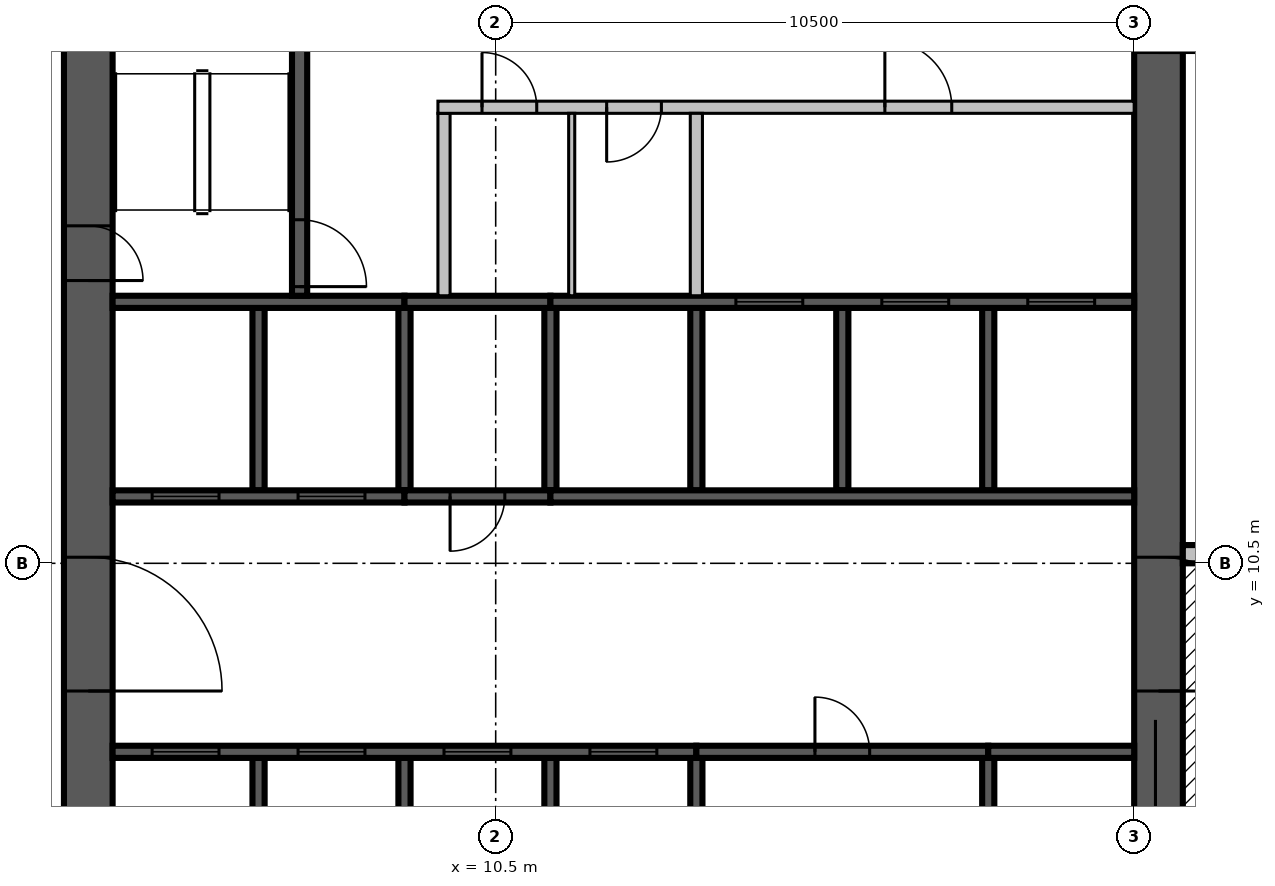
"""IFC4 building model, lengths in metres.
Left out: names, types, materials, properties, quantities, classifications, styles, units other than length and angle.
Written with IfcOpenShell. Run it as: python <this file> out.ifc"""

import sys

from ifc_helpers import new_model, si_unit, direction, frame, frame_2d, origin, place, context, subcontext, project, spatial, rectangle, extrude, source, transform, mapped, element, fill, save


model = new_model("IFC4")
c1 = context("Model", 3, precision=1e-05, world=origin(), true_north=direction((0.0, 1.0)))
c2 = subcontext(c1, "Body", "Model", "MODEL_VIEW")
j1 = project(units=[si_unit("LENGTHUNIT", "METRE"), si_unit("PLANEANGLEUNIT", "RADIAN")], contexts=[c1])
p1 = place(None, origin())
s1 = spatial("IfcSite", under=j1, at=p1, CompositionType="ELEMENT")
p2 = place(p1, origin())
s2 = spatial("IfcBuilding", under=s1, at=p2, CompositionType="ELEMENT")
p3 = place(p2, frame((0.0, 0.0, 204.4)))
s3 = spatial("IfcBuildingStorey", under=s2, at=p3, CompositionType="ELEMENT", Elevation=204.4)
m1 = source(origin(), c2, "Body", "SweptSolid", [
    extrude(rectangle(XDim=17.6, YDim=0.8, at=frame_2d((8.8, 0.0))), origin(), (0.0, 0.0, 1.0), 3.8),
])
p4 = place(p3, frame((3.8, 4.2, 0.0), z_axis=(0.0, 0.0, 1.0), x_axis=(0.0, 1.0, 0.0)))
e1 = element("IfcWall", 1, at=p4, inside=s3, PredefinedType="SHEAR", context=c2, shape_type="MappedRepresentation", body=[
    mapped(m1, transform((0.0, 0.0, 0.0), scale=1.0)),
])
m2 = source(origin(), c2, "Body", "SweptSolid", [
    extrude(rectangle(XDim=2.2, YDim=2.1, at=frame_2d((1.1, 1.05))), frame((0.0, 0.41, 0.0), z_axis=(0.0, -1.0, 0.0), x_axis=(1.0, 0.0, 0.0)), (0.0, 0.0, 1.0), 0.82),
])
p5 = place(p4, frame((4.2, 0.0, 0.0)))
e2 = element("IfcOpeningElement", 2, at=p5, cuts=e1, PredefinedType="OPENING", context=c2, shape_type="MappedRepresentation", body=[
    mapped(m2, transform((0.0, 0.0, 0.0), scale=1.0)),
])
m3 = source(origin(), c2, "Body", "SweptSolid", [
    extrude(rectangle(XDim=0.9, YDim=2.1, at=frame_2d((0.45, 1.05))), frame((0.0, 0.41, 0.0), z_axis=(0.0, -1.0, 0.0), x_axis=(1.0, 0.0, 0.0)), (0.0, 0.0, 1.0), 0.82),
])
p6 = place(p4, frame((10.95, 0.0, 0.0)))
e3 = element("IfcOpeningElement", 3, at=p6, cuts=e1, PredefinedType="OPENING", context=c2, shape_type="MappedRepresentation", body=[
    mapped(m3, transform((0.0, 0.0, 0.0), scale=1.0)),
])
m4 = source(origin(), c2, "Body", "SweptSolid", [
    extrude(rectangle(XDim=16.8, YDim=0.8, at=frame_2d((8.4, 0.0))), origin(), (0.0, 0.0, 1.0), 3.8),
])
p7 = place(p3, frame((21.4, 4.2, 0.0), z_axis=(0.0, 0.0, 1.0), x_axis=(0.0, 1.0, 0.0)))
e4 = element("IfcWall", 4, at=p7, inside=s3, PredefinedType="SHEAR", context=c2, shape_type="MappedRepresentation", body=[
    mapped(m4, transform((0.0, 0.0, 0.0), scale=1.0)),
])
p8 = place(p7, frame((4.2, 0.0, 0.0)))
e5 = element("IfcOpeningElement", 5, at=p8, cuts=e4, PredefinedType="OPENING", context=c2, shape_type="MappedRepresentation", body=[
    mapped(m2, transform((0.0, 0.0, 0.0), scale=1.0)),
])
m5 = source(origin(), c2, "Body", "SweptSolid", [
    extrude(rectangle(XDim=1.2, YDim=2.1, at=frame_2d((0.6, 1.05))), frame((0.0, 0.41, 0.0), z_axis=(0.0, -1.0, 0.0), x_axis=(1.0, 0.0, 0.0)), (0.0, 0.0, 1.0), 0.82),
])
p9 = place(p7, frame((14.7, 0.0, 0.0)))
e6 = element("IfcOpeningElement", 6, at=p9, cuts=e4, PredefinedType="OPENING", context=c2, shape_type="MappedRepresentation", body=[
    mapped(m5, transform((0.0, 0.0, 0.0), scale=1.0)),
])
p10 = place(p3, frame((21.8, 10.65, 0.0), z_axis=(0.0, 0.0, 1.0), x_axis=(1.0, 0.0, 0.0)))
e7 = element("IfcWall", 7, at=p10, inside=s3, PredefinedType="STANDARD", context=c2, shape_type="SweptSolid", body=[
    extrude(rectangle(XDim=7.15, YDim=0.3, at=frame_2d((3.575, 0.0))), origin(), (0.0, 0.0, 1.0), 2.4),
])
m6 = source(origin(), c2, "Body", "SweptSolid", [
    extrude(rectangle(XDim=1.8, YDim=2.4, at=frame_2d((0.9, 1.2))), frame((0.0, 0.16, 0.0), z_axis=(0.0, -1.0, 0.0), x_axis=(1.0, 0.0, 0.0)), (0.0, 0.0, 1.0), 0.32),
])
p11 = place(p10, frame((0.4, 0.0, 0.0)))
e8 = element("IfcOpeningElement", 8, at=p11, cuts=e7, PredefinedType="OPENING", context=c2, shape_type="MappedRepresentation", body=[
    mapped(m6, transform((0.0, 0.0, 0.0), scale=1.0)),
])
p12 = place(p10, frame((4.6, 0.0, 0.0)))
e9 = element("IfcOpeningElement", 9, at=p12, cuts=e7, PredefinedType="OPENING", context=c2, shape_type="MappedRepresentation", body=[
    mapped(m6, transform((0.0, 0.0, 0.0), scale=1.0)),
])
m7 = source(origin(), c2, "Body", "SweptSolid", [
    extrude(rectangle(XDim=3.1, YDim=0.2, at=frame_2d((1.55, 0.0))), origin(), (0.0, 0.0, 1.0), 3.8),
])
for number, where, z_axis, x_axis in (
    (10, (6.6, 4.2, 0.0), (0.0, 0.0, 1.0), (0.0, 1.0, 0.0)),
    (11, (9.0, 4.2, 0.0), (0.0, 0.0, 1.0), (0.0, 1.0, 0.0)),
    (12, (11.4, 4.2, 0.0), (0.0, 0.0, 1.0), (0.0, 1.0, 0.0)),
):
    element("IfcWall", number, at=place(p3, frame(where, z_axis=z_axis, x_axis=x_axis)), inside=s3, PredefinedType="SOLIDWALL", context=c2, shape_type="MappedRepresentation", body=[
        mapped(m7, transform((0.0, 0.0, 0.0), scale=1.0)),
    ])
m8 = source(origin(), c2, "Body", "SweptSolid", [
    extrude(rectangle(XDim=3.1, YDim=0.2, at=frame_2d((1.55, 0.0))), origin(), (0.0, 0.0, 1.0), 3.4),
])
for number, where, z_axis, x_axis in (
    (13, (13.8, 4.2, 0.0), (0.0, 0.0, 1.0), (0.0, 1.0, 0.0)),
    (14, (18.6, 4.2, 0.0), (0.0, 0.0, 1.0), (0.0, 1.0, 0.0)),
):
    element("IfcWall", number, at=place(p3, frame(where, z_axis=z_axis, x_axis=x_axis)), inside=s3, PredefinedType="SOLIDWALL", context=c2, shape_type="MappedRepresentation", body=[
        mapped(m8, transform((0.0, 0.0, 0.0), scale=1.0)),
    ])
m9 = source(origin(), c2, "Body", "SweptSolid", [
    extrude(rectangle(XDim=3.0, YDim=0.2, at=frame_2d((1.5, 0.0))), origin(), (0.0, 0.0, 1.0), 3.8),
])
p13 = place(p3, frame((6.6, 11.7, 0.0), z_axis=(0.0, 0.0, 1.0), x_axis=(0.0, 1.0, 0.0)))
e15 = element("IfcWall", 15, at=p13, inside=s3, PredefinedType="SOLIDWALL", context=c2, shape_type="MappedRepresentation", body=[
    mapped(m9, transform((0.0, 0.0, 0.0), scale=1.0)),
])
m10 = source(origin(), c2, "Body", "SweptSolid", [
    extrude(rectangle(XDim=3.0, YDim=0.2, at=frame_2d((1.5, 0.0))), origin(), (0.0, 0.0, 1.0), 3.4),
])
for number, where, z_axis, x_axis in (
    (16, (9.0, 11.7, 0.0), (0.0, 0.0, 1.0), (0.0, 1.0, 0.0)),
    (17, (11.4, 11.7, 0.0), (0.0, 0.0, 1.0), (0.0, 1.0, 0.0)),
):
    element("IfcWall", number, at=place(p3, frame(where, z_axis=z_axis, x_axis=x_axis)), inside=s3, PredefinedType="SOLIDWALL", context=c2, shape_type="MappedRepresentation", body=[
        mapped(m10, transform((0.0, 0.0, 0.0), scale=1.0)),
    ])
for number, where, z_axis, x_axis in (
    (18, (13.8, 11.7, 0.0), (0.0, 0.0, 1.0), (0.0, 1.0, 0.0)),
    (19, (16.2, 11.7, 0.0), (0.0, 0.0, 1.0), (0.0, 1.0, 0.0)),
    (20, (18.6, 11.7, 0.0), (0.0, 0.0, 1.0), (0.0, 1.0, 0.0)),
):
    element("IfcWall", number, at=place(p3, frame(where, z_axis=z_axis, x_axis=x_axis)), inside=s3, PredefinedType="SOLIDWALL", context=c2, shape_type="MappedRepresentation", body=[
        mapped(m9, transform((0.0, 0.0, 0.0), scale=1.0)),
    ])
m11 = source(origin(), c2, "Body", "SweptSolid", [
    extrude(rectangle(XDim=9.6, YDim=0.2, at=frame_2d((4.8, 0.0))), origin(), (0.0, 0.0, 1.0), 3.8),
])
p14 = place(p3, frame((4.2, 7.4, 0.0), z_axis=(0.0, 0.0, 1.0), x_axis=(1.0, 0.0, 0.0)))
e21 = element("IfcWall", 21, at=p14, inside=s3, PredefinedType="SOLIDWALL", context=c2, shape_type="MappedRepresentation", body=[
    mapped(m11, transform((0.0, 0.0, 0.0), scale=1.0)),
])
m12 = source(origin(), c2, "Body", "SweptSolid", [
    extrude(rectangle(XDim=1.1, YDim=2.1, at=frame_2d((0.55, 1.05))), frame((0.0, 0.11, 0.0), z_axis=(0.0, -1.0, 0.0), x_axis=(1.0, 0.0, 0.0)), (0.0, 0.0, 1.0), 0.22),
])
p15 = place(p14, frame((0.65, 0.0, 0.0)))
e22 = element("IfcOpeningElement", 22, at=p15, cuts=e21, PredefinedType="OPENING", context=c2, shape_type="MappedRepresentation", body=[
    mapped(m12, transform((0.0, 0.0, 0.0), scale=1.0)),
])
p16 = place(p14, frame((3.05, 0.0, 0.0)))
e23 = element("IfcOpeningElement", 23, at=p16, cuts=e21, PredefinedType="OPENING", context=c2, shape_type="MappedRepresentation", body=[
    mapped(m12, transform((0.0, 0.0, 0.0), scale=1.0)),
])
p17 = place(p14, frame((5.45, 0.0, 0.0)))
e24 = element("IfcOpeningElement", 24, at=p17, cuts=e21, PredefinedType="OPENING", context=c2, shape_type="MappedRepresentation", body=[
    mapped(m12, transform((0.0, 0.0, 0.0), scale=1.0)),
])
p18 = place(p14, frame((7.85, 0.0, 0.0)))
e25 = element("IfcOpeningElement", 25, at=p18, cuts=e21, PredefinedType="OPENING", context=c2, shape_type="MappedRepresentation", body=[
    mapped(m12, transform((0.0, 0.0, 0.0), scale=1.0)),
])
m13 = source(origin(), c2, "Body", "SweptSolid", [
    extrude(rectangle(XDim=4.8, YDim=0.2, at=frame_2d((2.4, 0.0))), origin(), (0.0, 0.0, 1.0), 3.4),
])
p19 = place(p3, frame((13.8, 7.4, 0.0), z_axis=(0.0, 0.0, 1.0), x_axis=(1.0, 0.0, 0.0)))
e26 = element("IfcWall", 26, at=p19, inside=s3, PredefinedType="SOLIDWALL", context=c2, shape_type="MappedRepresentation", body=[
    mapped(m13, transform((0.0, 0.0, 0.0), scale=1.0)),
])
m14 = source(origin(), c2, "Body", "SweptSolid", [
    extrude(rectangle(XDim=0.9, YDim=2.1, at=frame_2d((0.45, 1.05))), frame((0.0, 0.11, 0.0), z_axis=(0.0, -1.0, 0.0), x_axis=(1.0, 0.0, 0.0)), (0.0, 0.0, 1.0), 0.22),
])
p20 = place(p19, frame((1.95, 0.0, 0.0)))
e27 = element("IfcOpeningElement", 27, at=p20, cuts=e26, PredefinedType="OPENING", context=c2, shape_type="MappedRepresentation", body=[
    mapped(m14, transform((0.0, 0.0, 0.0), scale=1.0)),
])
m15 = source(origin(), c2, "Body", "SweptSolid", [
    extrude(rectangle(XDim=2.4, YDim=0.2, at=frame_2d((1.2, 0.0))), origin(), (0.0, 0.0, 1.0), 3.8),
])
p21 = place(p3, frame((18.6, 7.4, 0.0), z_axis=(0.0, 0.0, 1.0), x_axis=(1.0, 0.0, 0.0)))
e28 = element("IfcWall", 28, at=p21, inside=s3, PredefinedType="SOLIDWALL", context=c2, shape_type="MappedRepresentation", body=[
    mapped(m15, transform((0.0, 0.0, 0.0), scale=1.0)),
])
m16 = source(origin(), c2, "Body", "SweptSolid", [
    extrude(rectangle(XDim=4.8, YDim=0.2, at=frame_2d((2.4, 0.0))), origin(), (0.0, 0.0, 1.0), 3.8),
])
p22 = place(p3, frame((4.2, 11.6, 0.0), z_axis=(0.0, 0.0, 1.0), x_axis=(1.0, 0.0, 0.0)))
e29 = element("IfcWall", 29, at=p22, inside=s3, PredefinedType="SOLIDWALL", context=c2, shape_type="MappedRepresentation", body=[
    mapped(m16, transform((0.0, 0.0, 0.0), scale=1.0)),
])
p23 = place(p22, frame((0.65, 0.0, 0.0)))
e30 = element("IfcOpeningElement", 30, at=p23, cuts=e29, PredefinedType="OPENING", context=c2, shape_type="MappedRepresentation", body=[
    mapped(m12, transform((0.0, 0.0, 0.0), scale=1.0)),
])
p24 = place(p22, frame((3.05, 0.0, 0.0)))
e31 = element("IfcOpeningElement", 31, at=p24, cuts=e29, PredefinedType="OPENING", context=c2, shape_type="MappedRepresentation", body=[
    mapped(m12, transform((0.0, 0.0, 0.0), scale=1.0)),
])
m17 = source(origin(), c2, "Body", "SweptSolid", [
    extrude(rectangle(XDim=2.4, YDim=0.2, at=frame_2d((1.2, 0.0))), origin(), (0.0, 0.0, 1.0), 3.4),
])
p25 = place(p3, frame((9.0, 11.6, 0.0), z_axis=(0.0, 0.0, 1.0), x_axis=(1.0, 0.0, 0.0)))
e32 = element("IfcWall", 32, at=p25, inside=s3, PredefinedType="SOLIDWALL", context=c2, shape_type="MappedRepresentation", body=[
    mapped(m17, transform((0.0, 0.0, 0.0), scale=1.0)),
])
p26 = place(p25, frame((0.75, 0.0, 0.0)))
e33 = element("IfcOpeningElement", 33, at=p26, cuts=e32, PredefinedType="OPENING", context=c2, shape_type="MappedRepresentation", body=[
    mapped(m14, transform((0.0, 0.0, 0.0), scale=1.0)),
])
p27 = place(p3, frame((11.4, 11.6, 0.0), z_axis=(0.0, 0.0, 1.0), x_axis=(1.0, 0.0, 0.0)))
e34 = element("IfcWall", 34, at=p27, inside=s3, PredefinedType="SOLIDWALL", context=c2, shape_type="MappedRepresentation", body=[
    mapped(m11, transform((0.0, 0.0, 0.0), scale=1.0)),
])
p28 = place(p3, frame((4.2, 14.8, 0.0), z_axis=(0.0, 0.0, 1.0), x_axis=(1.0, 0.0, 0.0)))
e35 = element("IfcWall", 35, at=p28, inside=s3, PredefinedType="SOLIDWALL", context=c2, shape_type="MappedRepresentation", body=[
    mapped(m16, transform((0.0, 0.0, 0.0), scale=1.0)),
])
p29 = place(p3, frame((9.0, 14.8, 0.0), z_axis=(0.0, 0.0, 1.0), x_axis=(1.0, 0.0, 0.0)))
e36 = element("IfcWall", 36, at=p29, inside=s3, PredefinedType="SOLIDWALL", context=c2, shape_type="MappedRepresentation", body=[
    mapped(m17, transform((0.0, 0.0, 0.0), scale=1.0)),
])
p30 = place(p3, frame((11.4, 14.8, 0.0), z_axis=(0.0, 0.0, 1.0), x_axis=(1.0, 0.0, 0.0)))
e37 = element("IfcWall", 37, at=p30, inside=s3, PredefinedType="SOLIDWALL", context=c2, shape_type="MappedRepresentation", body=[
    mapped(m11, transform((0.0, 0.0, 0.0), scale=1.0)),
])
p31 = place(p30, frame((3.05, 0.0, 0.0)))
e38 = element("IfcOpeningElement", 38, at=p31, cuts=e37, PredefinedType="OPENING", context=c2, shape_type="MappedRepresentation", body=[
    mapped(m12, transform((0.0, 0.0, 0.0), scale=1.0)),
])
p32 = place(p30, frame((5.45, 0.0, 0.0)))
e39 = element("IfcOpeningElement", 39, at=p32, cuts=e37, PredefinedType="OPENING", context=c2, shape_type="MappedRepresentation", body=[
    mapped(m12, transform((0.0, 0.0, 0.0), scale=1.0)),
])
p33 = place(p30, frame((7.85, 0.0, 0.0)))
e40 = element("IfcOpeningElement", 40, at=p33, cuts=e37, PredefinedType="OPENING", context=c2, shape_type="MappedRepresentation", body=[
    mapped(m12, transform((0.0, 0.0, 0.0), scale=1.0)),
])
m18 = source(origin(), c2, "Body", "SweptSolid", [
    extrude(rectangle(XDim=6.6, YDim=0.25, at=frame_2d((3.3, 0.0))), origin(), (0.0, 0.0, 1.0), 3.4),
])
p34 = place(p3, frame((7.275, 14.9, 0.0), z_axis=(0.0, 0.0, 1.0), x_axis=(0.0, 1.0, 0.0)))
e41 = element("IfcWall", 41, at=p34, inside=s3, PredefinedType="SOLIDWALL", context=c2, shape_type="MappedRepresentation", body=[
    mapped(m18, transform((0.0, 0.0, 0.0), scale=1.0)),
])
m19 = source(origin(), c2, "Body", "SweptSolid", [
    extrude(rectangle(XDim=1.1, YDim=2.1, at=frame_2d((0.55, 1.05))), frame((0.0, 0.135, 0.0), z_axis=(0.0, -1.0, 0.0), x_axis=(1.0, 0.0, 0.0)), (0.0, 0.0, 1.0), 0.27),
])
p35 = place(p34, frame((0.15, 0.0, 0.0)))
e42 = element("IfcOpeningElement", 42, at=p35, cuts=e41, PredefinedType="OPENING", context=c2, shape_type="MappedRepresentation", body=[
    mapped(m19, transform((0.0, 0.0, 0.0), scale=1.0)),
])
m20 = source(origin(), c2, "Body", "SweptSolid", [
    extrude(rectangle(XDim=3.0, YDim=0.2, at=frame_2d((1.5, 0.0))), origin(), (0.0, 0.0, 1.0), 3.4),
])
p36 = place(p3, frame((9.65, 14.9, 0.0), z_axis=(0.0, 0.0, 1.0), x_axis=(0.0, 1.0, 0.0)))
e43 = element("IfcWall", 43, at=p36, inside=s3, PredefinedType="PARTITIONING", context=c2, shape_type="MappedRepresentation", body=[
    mapped(m20, transform((0.0, 0.0, 0.0), scale=1.0)),
])
m21 = source(origin(), c2, "Body", "SweptSolid", [
    extrude(rectangle(XDim=11.45, YDim=0.2, at=frame_2d((5.725, 0.0))), origin(), (0.0, 0.0, 1.0), 3.4),
])
p37 = place(p3, frame((9.55, 18.0, 0.0), z_axis=(0.0, 0.0, 1.0), x_axis=(1.0, 0.0, 0.0)))
e44 = element("IfcWall", 44, at=p37, inside=s3, PredefinedType="PARTITIONING", context=c2, shape_type="MappedRepresentation", body=[
    mapped(m21, transform((0.0, 0.0, 0.0), scale=1.0)),
])
p38 = place(p37, frame((0.725, 0.0, 0.0)))
e45 = element("IfcOpeningElement", 45, at=p38, cuts=e44, PredefinedType="OPENING", context=c2, shape_type="MappedRepresentation", body=[
    mapped(m14, transform((0.0, 0.0, 0.0), scale=1.0)),
])
p39 = place(p37, frame((2.775, 0.0, 0.0)))
e46 = element("IfcOpeningElement", 46, at=p39, cuts=e44, PredefinedType="OPENING", context=c2, shape_type="MappedRepresentation", body=[
    mapped(m14, transform((0.0, 0.0, 0.0), scale=1.0)),
])
p40 = place(p37, frame((7.35, 0.0, 0.0)))
e47 = element("IfcOpeningElement", 47, at=p40, cuts=e44, PredefinedType="OPENING", context=c2, shape_type="MappedRepresentation", body=[
    mapped(m12, transform((0.0, 0.0, 0.0), scale=1.0)),
])
p41 = place(p3, frame((13.8, 14.9, 0.0), z_axis=(0.0, 0.0, 1.0), x_axis=(0.0, 1.0, 0.0)))
e48 = element("IfcWall", 48, at=p41, inside=s3, PredefinedType="PARTITIONING", context=c2, shape_type="MappedRepresentation", body=[
    mapped(m20, transform((0.0, 0.0, 0.0), scale=1.0)),
])
m22 = source(origin(), c2, "Body", "SweptSolid", [
    extrude(rectangle(XDim=3.0, YDim=0.1, at=frame_2d((1.5, 0.0))), origin(), (0.0, 0.0, 1.0), 3.4),
])
p42 = place(p3, frame((11.75, 14.9, 0.0), z_axis=(0.0, 0.0, 1.0), x_axis=(0.0, 1.0, 0.0)))
e49 = element("IfcWall", 49, at=p42, inside=s3, PredefinedType="PARTITIONING", context=c2, shape_type="MappedRepresentation", body=[
    mapped(m22, transform((0.0, 0.0, 0.0), scale=1.0)),
])
m23 = source(origin(), c2, "Body", "SweptSolid", [
    extrude(rectangle(XDim=1.1, YDim=2.1, at=frame_2d((0.55, 1.05))), frame((0.0, 0.025, 0.0), z_axis=(0.0, -1.0, 0.0), x_axis=(1.0, 0.0, 0.0)), (0.0, 0.0, 1.0), 0.05),
])
p43 = place(p15, origin())
e50 = element("IfcDoor", 50, at=p43, inside=s3, OperationType="SLIDING_TO_LEFT", PredefinedType="DOOR", context=c2, shape_type="MappedRepresentation", body=[
    mapped(m23, transform((0.0, 0.0, 0.0), scale=1.0)),
])
fill(e22, e50)
p44 = place(p16, origin())
e51 = element("IfcDoor", 51, at=p44, inside=s3, OperationType="SLIDING_TO_LEFT", PredefinedType="DOOR", context=c2, shape_type="MappedRepresentation", body=[
    mapped(m23, transform((0.0, 0.0, 0.0), scale=1.0)),
])
fill(e23, e51)
p45 = place(p17, origin())
e52 = element("IfcDoor", 52, at=p45, inside=s3, OperationType="SLIDING_TO_LEFT", PredefinedType="DOOR", context=c2, shape_type="MappedRepresentation", body=[
    mapped(m23, transform((0.0, 0.0, 0.0), scale=1.0)),
])
fill(e24, e52)
p46 = place(p18, origin())
e53 = element("IfcDoor", 53, at=p46, inside=s3, OperationType="SLIDING_TO_LEFT", PredefinedType="DOOR", context=c2, shape_type="MappedRepresentation", body=[
    mapped(m23, transform((0.0, 0.0, 0.0), scale=1.0)),
])
fill(e25, e53)
m24 = source(origin(), c2, "Body", "SweptSolid", [
    extrude(rectangle(XDim=0.9, YDim=2.1, at=frame_2d((0.45, 1.05))), frame((0.0, 0.025, 0.0), z_axis=(0.0, -1.0, 0.0), x_axis=(1.0, 0.0, 0.0)), (0.0, 0.0, 1.0), 0.05),
])
p47 = place(p20, origin())
e54 = element("IfcDoor", 54, at=p47, inside=s3, OperationType="SINGLE_SWING_LEFT", PredefinedType="DOOR", context=c2, shape_type="MappedRepresentation", body=[
    mapped(m24, transform((0.0, 0.0, 0.0), scale=1.0)),
])
fill(e27, e54)
p48 = place(p23, origin())
e55 = element("IfcDoor", 55, at=p48, inside=s3, OperationType="SLIDING_TO_LEFT", PredefinedType="DOOR", context=c2, shape_type="MappedRepresentation", body=[
    mapped(m23, transform((0.0, 0.0, 0.0), scale=1.0)),
])
fill(e30, e55)
p49 = place(p24, origin())
e56 = element("IfcDoor", 56, at=p49, inside=s3, OperationType="SLIDING_TO_LEFT", PredefinedType="DOOR", context=c2, shape_type="MappedRepresentation", body=[
    mapped(m23, transform((0.0, 0.0, 0.0), scale=1.0)),
])
fill(e31, e56)
p50 = place(p26, origin())
e57 = element("IfcDoor", 57, at=p50, inside=s3, OperationType="SINGLE_SWING_RIGHT", PredefinedType="DOOR", context=c2, shape_type="MappedRepresentation", body=[
    mapped(m24, transform((0.0, 0.0, 0.0), scale=1.0)),
])
fill(e33, e57)
p51 = place(p31, origin())
e58 = element("IfcDoor", 58, at=p51, inside=s3, OperationType="SLIDING_TO_LEFT", PredefinedType="DOOR", context=c2, shape_type="MappedRepresentation", body=[
    mapped(m23, transform((0.0, 0.0, 0.0), scale=1.0)),
])
fill(e38, e58)
p52 = place(p32, origin())
e59 = element("IfcDoor", 59, at=p52, inside=s3, OperationType="SLIDING_TO_LEFT", PredefinedType="DOOR", context=c2, shape_type="MappedRepresentation", body=[
    mapped(m23, transform((0.0, 0.0, 0.0), scale=1.0)),
])
fill(e39, e59)
p53 = place(p33, origin())
e60 = element("IfcDoor", 60, at=p53, inside=s3, OperationType="SLIDING_TO_LEFT", PredefinedType="DOOR", context=c2, shape_type="MappedRepresentation", body=[
    mapped(m23, transform((0.0, 0.0, 0.0), scale=1.0)),
])
fill(e40, e60)
p54 = place(p35, origin())
e61 = element("IfcDoor", 61, at=p54, inside=s3, OperationType="SINGLE_SWING_RIGHT", PredefinedType="DOOR", context=c2, shape_type="MappedRepresentation", body=[
    mapped(m23, transform((0.0, 0.0, 0.0), scale=1.0)),
])
fill(e42, e61)
p55 = place(p38, origin())
e62 = element("IfcDoor", 62, at=p55, inside=s3, OperationType="SINGLE_SWING_LEFT", PredefinedType="DOOR", context=c2, shape_type="MappedRepresentation", body=[
    mapped(m24, transform((0.0, 0.0, 0.0), scale=1.0)),
])
fill(e45, e62)
p56 = place(p39, origin())
e63 = element("IfcDoor", 63, at=p56, inside=s3, OperationType="SINGLE_SWING_RIGHT", PredefinedType="DOOR", context=c2, shape_type="MappedRepresentation", body=[
    mapped(m24, transform((0.0, 0.0, 0.0), scale=1.0)),
])
fill(e46, e63)
p57 = place(p40, origin())
e64 = element("IfcDoor", 64, at=p57, inside=s3, OperationType="SINGLE_SWING_LEFT", PredefinedType="DOOR", context=c2, shape_type="MappedRepresentation", body=[
    mapped(m23, transform((0.0, 0.0, 0.0), scale=1.0)),
])
fill(e47, e64)
m25 = source(origin(), c2, "Body", "SweptSolid", [
    extrude(rectangle(XDim=2.2, YDim=2.1, at=frame_2d((1.1, 1.05))), frame((0.0, 0.025, 0.0), z_axis=(0.0, -1.0, 0.0), x_axis=(1.0, 0.0, 0.0)), (0.0, 0.0, 1.0), 0.05),
])
p58 = place(p8, origin())
e65 = element("IfcDoor", 65, at=p58, inside=s3, OperationType="DOUBLE_DOOR_SINGLE_SWING", PredefinedType="DOOR", context=c2, shape_type="MappedRepresentation", body=[
    mapped(m25, transform((0.0, 0.0, 0.0), scale=1.0)),
])
fill(e5, e65)
p59 = place(p5, origin())
e66 = element("IfcDoor", 66, at=p59, inside=s3, OperationType="DOUBLE_DOOR_SINGLE_SWING", PredefinedType="DOOR", context=c2, shape_type="MappedRepresentation", body=[
    mapped(m25, transform((0.0, 0.0, 0.0), scale=1.0)),
])
fill(e2, e66)
p60 = place(p6, origin())
e67 = element("IfcDoor", 67, at=p60, inside=s3, OperationType="SINGLE_SWING_RIGHT", PredefinedType="DOOR", context=c2, shape_type="MappedRepresentation", body=[
    mapped(m24, transform((0.0, 0.0, 0.0), scale=1.0)),
])
fill(e3, e67)
save(model, sys.argv[1])
